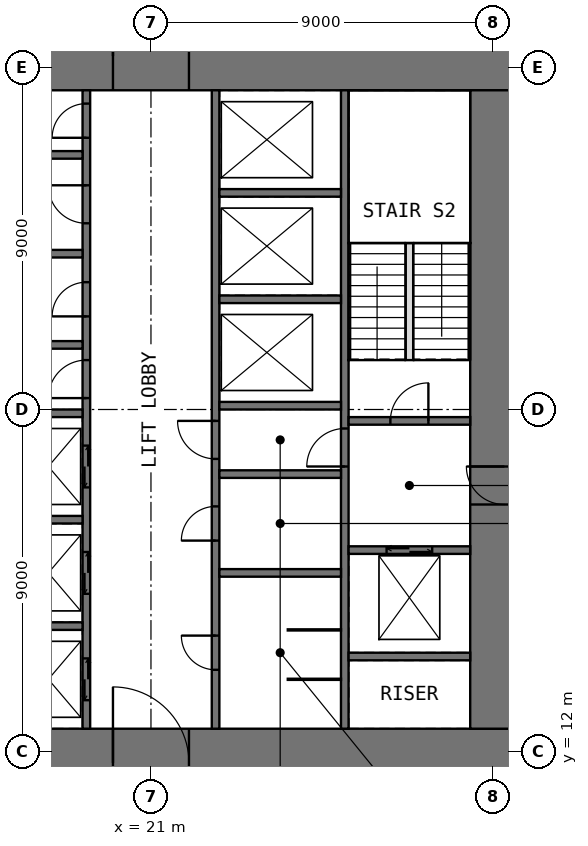
"""IFC4 building model, lengths in metres.
Left out: names, types, materials, properties, quantities, classifications, styles, units other than length and angle.
Written with IfcOpenShell. Run it as: python <this file> out.ifc"""

import sys

from ifc_helpers import new_model, si_unit, direction, frame, frame_2d, origin, place, context, subcontext, project, spatial, rectangle, extrude, element, fill, save


model = new_model("IFC4")
c1 = context("Model", 3, precision=1e-05, world=origin(), true_north=direction((0.0, 1.0)))
c2 = subcontext(c1, "Body", "Model", "MODEL_VIEW")
j1 = project(units=[si_unit("LENGTHUNIT", "METRE"), si_unit("PLANEANGLEUNIT", "RADIAN")], contexts=[c1])
p1 = place(None, origin())
s1 = spatial("IfcSite", under=j1, at=p1, CompositionType="ELEMENT")
p2 = place(p1, origin())
s2 = spatial("IfcBuilding", under=s1, at=p2, CompositionType="ELEMENT")
p3 = place(p2, frame((0.0, 0.0, 54.5)))
s3 = spatial("IfcBuildingStorey", under=s2, at=p3, CompositionType="ELEMENT", Elevation=54.5)
p4 = place(p3, frame((10.8, 11.7, -0.05), z_axis=(0.0, 0.0, 1.0), x_axis=(1.0, 0.0, 0.0)))
e1 = element("IfcWall", 1, at=p4, inside=s3, PredefinedType="SHEAR", context=c2, shape_type="SweptSolid", body=[
    extrude(rectangle(XDim=20.4, YDim=1.8, at=frame_2d((10.2, 0.0))), origin(), (0.0, 0.0, 1.0), 4.0),
])
p5 = place(p4, frame((9.2, 0.0, 0.05)))
e2 = element("IfcOpeningElement", 2, at=p5, cuts=e1, PredefinedType="OPENING", context=c2, shape_type="SweptSolid", body=[
    extrude(rectangle(XDim=2.0, YDim=2.2, at=frame_2d((1.0, 1.1))), frame((0.0, 0.91, 0.0), z_axis=(0.0, -1.0, 0.0), x_axis=(1.0, 0.0, 0.0)), (0.0, 0.0, 1.0), 1.82),
])
p6 = place(p3, frame((10.8, 30.3, -0.05), z_axis=(0.0, 0.0, 1.0), x_axis=(1.0, 0.0, 0.0)))
e3 = element("IfcWall", 3, at=p6, inside=s3, PredefinedType="SHEAR", context=c2, shape_type="SweptSolid", body=[
    extrude(rectangle(XDim=20.4, YDim=1.8, at=frame_2d((10.2, 0.0))), origin(), (0.0, 0.0, 1.0), 4.0),
])
p7 = place(p6, frame((9.2, 0.0, 0.05)))
e4 = element("IfcOpeningElement", 4, at=p7, cuts=e3, PredefinedType="OPENING", context=c2, shape_type="SweptSolid", body=[
    extrude(rectangle(XDim=2.0, YDim=2.2, at=frame_2d((1.0, 1.1))), frame((0.0, 0.91, 0.0), z_axis=(0.0, -1.0, 0.0), x_axis=(1.0, 0.0, 0.0)), (0.0, 0.0, 1.0), 1.82),
])
p8 = place(p3, frame((30.3, 12.6, -0.05), z_axis=(0.0, 0.0, 1.0), x_axis=(0.0, 1.0, 0.0)))
e5 = element("IfcWall", 5, at=p8, inside=s3, PredefinedType="SHEAR", context=c2, shape_type="SweptSolid", body=[
    extrude(rectangle(XDim=16.8, YDim=1.8, at=frame_2d((8.4, 0.0))), origin(), (0.0, 0.0, 1.0), 4.0),
])
p9 = place(p8, frame((5.9, 0.0, 0.05)))
e6 = element("IfcOpeningElement", 6, at=p9, cuts=e5, PredefinedType="OPENING", context=c2, shape_type="SweptSolid", body=[
    extrude(rectangle(XDim=1.0, YDim=2.2, at=frame_2d((0.5, 1.1))), frame((0.0, 0.91, 0.0), z_axis=(0.0, -1.0, 0.0), x_axis=(1.0, 0.0, 0.0)), (0.0, 0.0, 1.0), 1.82),
])
p10 = place(p3, frame((19.3, 12.6, -0.05), z_axis=(0.0, 0.0, 1.0), x_axis=(0.0, 1.0, 0.0)))
e7 = element("IfcWall", 7, at=p10, inside=s3, PredefinedType="SHEAR", context=c2, shape_type="SweptSolid", body=[
    extrude(rectangle(XDim=16.8, YDim=0.2, at=frame_2d((8.4, 0.0))), origin(), (0.0, 0.0, 1.0), 4.0),
])
p11 = place(p10, frame((8.7, 0.0, 0.05)))
e8 = element("IfcOpeningElement", 8, at=p11, cuts=e7, PredefinedType="OPENING", context=c2, shape_type="SweptSolid", body=[
    extrude(rectangle(XDim=1.0, YDim=2.2, at=frame_2d((0.5, 1.1))), frame((0.0, 0.11, 0.0), z_axis=(0.0, -1.0, 0.0), x_axis=(1.0, 0.0, 0.0)), (0.0, 0.0, 1.0), 0.22),
])
p12 = place(p10, frame((10.85, 0.0, 0.05)))
e9 = element("IfcOpeningElement", 9, at=p12, cuts=e7, PredefinedType="OPENING", context=c2, shape_type="SweptSolid", body=[
    extrude(rectangle(XDim=0.9, YDim=2.2, at=frame_2d((0.45, 1.1))), frame((0.0, 0.11, 0.0), z_axis=(0.0, -1.0, 0.0), x_axis=(1.0, 0.0, 0.0)), (0.0, 0.0, 1.0), 0.22),
])
p13 = place(p10, frame((13.3, 0.0, 0.05)))
e10 = element("IfcOpeningElement", 10, at=p13, cuts=e7, PredefinedType="OPENING", context=c2, shape_type="SweptSolid", body=[
    extrude(rectangle(XDim=1.0, YDim=2.2, at=frame_2d((0.5, 1.1))), frame((0.0, 0.11, 0.0), z_axis=(0.0, -1.0, 0.0), x_axis=(1.0, 0.0, 0.0)), (0.0, 0.0, 1.0), 0.22),
])
p14 = place(p10, frame((15.55, 0.0, 0.05)))
e11 = element("IfcOpeningElement", 11, at=p14, cuts=e7, PredefinedType="OPENING", context=c2, shape_type="SweptSolid", body=[
    extrude(rectangle(XDim=0.9, YDim=2.2, at=frame_2d((0.45, 1.1))), frame((0.0, 0.11, 0.0), z_axis=(0.0, -1.0, 0.0), x_axis=(1.0, 0.0, 0.0)), (0.0, 0.0, 1.0), 0.22),
])
p15 = place(p10, frame((0.75, 0.0, 0.05)))
e12 = element("IfcOpeningElement", 12, at=p15, cuts=e7, PredefinedType="OPENING", context=c2, shape_type="SweptSolid", body=[
    extrude(rectangle(XDim=1.1, YDim=2.2, at=frame_2d((0.55, 1.1))), frame((0.0, 0.11, 0.0), z_axis=(0.0, -1.0, 0.0), x_axis=(1.0, 0.0, 0.0)), (0.0, 0.0, 1.0), 0.22),
])
p16 = place(p10, frame((3.55, 0.0, 0.05)))
e13 = element("IfcOpeningElement", 13, at=p16, cuts=e7, PredefinedType="OPENING", context=c2, shape_type="SweptSolid", body=[
    extrude(rectangle(XDim=1.1, YDim=2.2, at=frame_2d((0.55, 1.1))), frame((0.0, 0.11, 0.0), z_axis=(0.0, -1.0, 0.0), x_axis=(1.0, 0.0, 0.0)), (0.0, 0.0, 1.0), 0.22),
])
p17 = place(p10, frame((6.35, 0.0, 0.05)))
e14 = element("IfcOpeningElement", 14, at=p17, cuts=e7, PredefinedType="OPENING", context=c2, shape_type="SweptSolid", body=[
    extrude(rectangle(XDim=1.1, YDim=2.2, at=frame_2d((0.55, 1.1))), frame((0.0, 0.11, 0.0), z_axis=(0.0, -1.0, 0.0), x_axis=(1.0, 0.0, 0.0)), (0.0, 0.0, 1.0), 0.22),
])
p18 = place(p3, frame((22.7, 12.6, -0.05), z_axis=(0.0, 0.0, 1.0), x_axis=(0.0, 1.0, 0.0)))
e15 = element("IfcWall", 15, at=p18, inside=s3, PredefinedType="SHEAR", context=c2, shape_type="SweptSolid", body=[
    extrude(rectangle(XDim=16.8, YDim=0.2, at=frame_2d((8.4, 0.0))), origin(), (0.0, 0.0, 1.0), 4.0),
])
p19 = place(p18, frame((7.1, 0.0, 0.05)))
e16 = element("IfcOpeningElement", 16, at=p19, cuts=e15, PredefinedType="OPENING", context=c2, shape_type="SweptSolid", body=[
    extrude(rectangle(XDim=1.0, YDim=2.2, at=frame_2d((0.5, 1.1))), frame((0.0, 0.11, 0.0), z_axis=(0.0, -1.0, 0.0), x_axis=(1.0, 0.0, 0.0)), (0.0, 0.0, 1.0), 0.22),
])
p20 = place(p18, frame((1.55, 0.0, 0.05)))
e17 = element("IfcOpeningElement", 17, at=p20, cuts=e15, PredefinedType="OPENING", context=c2, shape_type="SweptSolid", body=[
    extrude(rectangle(XDim=0.9, YDim=2.2, at=frame_2d((0.45, 1.1))), frame((0.0, 0.11, 0.0), z_axis=(0.0, -1.0, 0.0), x_axis=(1.0, 0.0, 0.0)), (0.0, 0.0, 1.0), 0.22),
])
p21 = place(p18, frame((4.95, 0.0, 0.05)))
e18 = element("IfcOpeningElement", 18, at=p21, cuts=e15, PredefinedType="OPENING", context=c2, shape_type="SweptSolid", body=[
    extrude(rectangle(XDim=0.9, YDim=2.2, at=frame_2d((0.45, 1.1))), frame((0.0, 0.11, 0.0), z_axis=(0.0, -1.0, 0.0), x_axis=(1.0, 0.0, 0.0)), (0.0, 0.0, 1.0), 0.22),
])
p22 = place(p3, frame((26.1, 12.6, -0.05), z_axis=(0.0, 0.0, 1.0), x_axis=(0.0, 1.0, 0.0)))
e19 = element("IfcWall", 19, at=p22, inside=s3, PredefinedType="SHEAR", context=c2, shape_type="SweptSolid", body=[
    extrude(rectangle(XDim=16.8, YDim=0.2, at=frame_2d((8.4, 0.0))), origin(), (0.0, 0.0, 1.0), 4.0),
])
p23 = place(p22, frame((6.9, 0.0, 0.05)))
e20 = element("IfcOpeningElement", 20, at=p23, cuts=e19, PredefinedType="OPENING", context=c2, shape_type="SweptSolid", body=[
    extrude(rectangle(XDim=1.0, YDim=2.2, at=frame_2d((0.5, 1.1))), frame((0.0, 0.11, 0.0), z_axis=(0.0, -1.0, 0.0), x_axis=(1.0, 0.0, 0.0)), (0.0, 0.0, 1.0), 0.22),
])
for number, where, z_axis, x_axis in (
    (21, (16.0, 15.3, -0.05), (0.0, 0.0, 1.0), (1.0, 0.0, 0.0)),
    (22, (16.0, 18.1, -0.05), (0.0, 0.0, 1.0), (1.0, 0.0, 0.0)),
    (23, (16.0, 20.9, -0.05), (0.0, 0.0, 1.0), (1.0, 0.0, 0.0)),
    (24, (16.0, 22.7, -0.05), (0.0, 0.0, 1.0), (1.0, 0.0, 0.0)),
    (25, (16.0, 25.1, -0.05), (0.0, 0.0, 1.0), (1.0, 0.0, 0.0)),
    (26, (16.0, 27.7, -0.05), (0.0, 0.0, 1.0), (1.0, 0.0, 0.0)),
    (27, (22.8, 16.7, -0.05), (0.0, 0.0, 1.0), (1.0, 0.0, 0.0)),
    (28, (22.8, 19.3, -0.05), (0.0, 0.0, 1.0), (1.0, 0.0, 0.0)),
    (29, (22.8, 21.1, -0.05), (0.0, 0.0, 1.0), (1.0, 0.0, 0.0)),
    (30, (22.8, 23.9, -0.05), (0.0, 0.0, 1.0), (1.0, 0.0, 0.0)),
    (31, (22.8, 26.7, -0.05), (0.0, 0.0, 1.0), (1.0, 0.0, 0.0)),
    (32, (26.2, 14.5, -0.05), (0.0, 0.0, 1.0), (1.0, 0.0, 0.0)),
):
    element("IfcWall", number, at=place(p3, frame(where, z_axis=z_axis, x_axis=x_axis)), inside=s3, PredefinedType="SHEAR", context=c2, shape_type="SweptSolid", body=[
        extrude(rectangle(XDim=3.2, YDim=0.2, at=frame_2d((1.6, 0.0))), origin(), (0.0, 0.0, 1.0), 4.0),
    ])
p24 = place(p3, frame((26.2, 17.3, -0.05), z_axis=(0.0, 0.0, 1.0), x_axis=(1.0, 0.0, 0.0)))
e33 = element("IfcWall", 33, at=p24, inside=s3, PredefinedType="SHEAR", context=c2, shape_type="SweptSolid", body=[
    extrude(rectangle(XDim=3.2, YDim=0.2, at=frame_2d((1.6, 0.0))), origin(), (0.0, 0.0, 1.0), 4.0),
])
p25 = place(p24, frame((1.0, 0.0, 0.05)))
e34 = element("IfcOpeningElement", 34, at=p25, cuts=e33, PredefinedType="OPENING", context=c2, shape_type="SweptSolid", body=[
    extrude(rectangle(XDim=1.2, YDim=2.2, at=frame_2d((0.6, 1.1))), frame((0.0, 0.11, 0.0), z_axis=(0.0, -1.0, 0.0), x_axis=(1.0, 0.0, 0.0)), (0.0, 0.0, 1.0), 0.22),
])
p26 = place(p3, frame((26.2, 20.7, -0.05), z_axis=(0.0, 0.0, 1.0), x_axis=(1.0, 0.0, 0.0)))
e35 = element("IfcWall", 35, at=p26, inside=s3, PredefinedType="SHEAR", context=c2, shape_type="SweptSolid", body=[
    extrude(rectangle(XDim=3.2, YDim=0.2, at=frame_2d((1.6, 0.0))), origin(), (0.0, 0.0, 1.0), 4.0),
])
p27 = place(p26, frame((1.1, 0.0, 0.05)))
e36 = element("IfcOpeningElement", 36, at=p27, cuts=e35, PredefinedType="OPENING", context=c2, shape_type="SweptSolid", body=[
    extrude(rectangle(XDim=1.0, YDim=2.2, at=frame_2d((0.5, 1.1))), frame((0.0, 0.11, 0.0), z_axis=(0.0, -1.0, 0.0), x_axis=(1.0, 0.0, 0.0)), (0.0, 0.0, 1.0), 0.22),
])
for number, where, z_axis, x_axis in (
    (37, (24.6, 13.9, 0.0), (0.0, 0.0, 1.0), (1.0, 0.0, 0.0)),
    (38, (24.6, 15.2, 0.0), (0.0, 0.0, 1.0), (1.0, 0.0, 0.0)),
):
    element("IfcWall", number, at=place(p3, frame(where, z_axis=z_axis, x_axis=x_axis)), inside=s3, PredefinedType="PARTITIONING", context=c2, shape_type="SweptSolid", body=[
        extrude(rectangle(XDim=1.4, YDim=0.03, at=frame_2d((0.7, 0.0))), origin(), (0.0, 0.0, 1.0), 3.75),
    ])
p28 = place(p3, frame((27.8, 22.3, 0.0), z_axis=(0.0, 0.0, 1.0), x_axis=(0.0, 1.0, 0.0)))
e39 = element("IfcWall", 39, at=p28, inside=s3, PredefinedType="PARTITIONING", context=c2, shape_type="SweptSolid", body=[
    extrude(rectangle(XDim=3.08, YDim=0.2, at=frame_2d((1.54, 0.0))), origin(), (0.0, 0.0, 1.0), 4.0),
])
p29 = place(p5, origin())
e40 = element("IfcDoor", 40, at=p29, inside=s3, OperationType="DOUBLE_DOOR_SINGLE_SWING", PredefinedType="DOOR", context=c2, shape_type="SweptSolid", body=[
    extrude(rectangle(XDim=2.0, YDim=2.2, at=frame_2d((1.0, 1.1))), frame((0.0, 0.025, 0.0), z_axis=(0.0, -1.0, 0.0), x_axis=(1.0, 0.0, 0.0)), (0.0, 0.0, 1.0), 0.05),
])
fill(e2, e40)
p30 = place(p7, origin())
e41 = element("IfcDoor", 41, at=p30, inside=s3, OperationType="DOUBLE_DOOR_SINGLE_SWING", PredefinedType="DOOR", context=c2, shape_type="SweptSolid", body=[
    extrude(rectangle(XDim=2.0, YDim=2.2, at=frame_2d((1.0, 1.1))), frame((0.0, 0.025, 0.0), z_axis=(0.0, -1.0, 0.0), x_axis=(1.0, 0.0, 0.0)), (0.0, 0.0, 1.0), 0.05),
])
fill(e4, e41)
p31 = place(p9, origin())
e42 = element("IfcDoor", 42, at=p31, inside=s3, OperationType="SINGLE_SWING_RIGHT", PredefinedType="DOOR", context=c2, shape_type="SweptSolid", body=[
    extrude(rectangle(XDim=1.0, YDim=2.2, at=frame_2d((0.5, 1.1))), frame((0.0, 0.025, 0.0), z_axis=(0.0, -1.0, 0.0), x_axis=(1.0, 0.0, 0.0)), (0.0, 0.0, 1.0), 0.05),
])
fill(e6, e42)
p32 = place(p27, origin())
e43 = element("IfcDoor", 43, at=p32, inside=s3, OperationType="SINGLE_SWING_RIGHT", PredefinedType="DOOR", context=c2, shape_type="SweptSolid", body=[
    extrude(rectangle(XDim=1.0, YDim=2.2, at=frame_2d((0.5, 1.1))), frame((0.0, 0.025, 0.0), z_axis=(0.0, -1.0, 0.0), x_axis=(1.0, 0.0, 0.0)), (0.0, 0.0, 1.0), 0.05),
])
fill(e36, e43)
p33 = place(p23, origin())
e44 = element("IfcDoor", 44, at=p33, inside=s3, OperationType="SINGLE_SWING_LEFT", PredefinedType="DOOR", context=c2, shape_type="SweptSolid", body=[
    extrude(rectangle(XDim=1.0, YDim=2.2, at=frame_2d((0.5, 1.1))), frame((0.0, 0.025, 0.0), z_axis=(0.0, -1.0, 0.0), x_axis=(1.0, 0.0, 0.0)), (0.0, 0.0, 1.0), 0.05),
])
fill(e20, e44)
p34 = place(p11, origin())
e45 = element("IfcDoor", 45, at=p34, inside=s3, OperationType="SINGLE_SWING_LEFT", PredefinedType="DOOR", context=c2, shape_type="SweptSolid", body=[
    extrude(rectangle(XDim=1.0, YDim=2.2, at=frame_2d((0.5, 1.1))), frame((0.0, 0.025, 0.0), z_axis=(0.0, -1.0, 0.0), x_axis=(1.0, 0.0, 0.0)), (0.0, 0.0, 1.0), 0.05),
])
fill(e8, e45)
p35 = place(p19, origin())
e46 = element("IfcDoor", 46, at=p35, inside=s3, OperationType="SINGLE_SWING_RIGHT", PredefinedType="DOOR", context=c2, shape_type="SweptSolid", body=[
    extrude(rectangle(XDim=1.0, YDim=2.2, at=frame_2d((0.5, 1.1))), frame((0.0, 0.025, 0.0), z_axis=(0.0, -1.0, 0.0), x_axis=(1.0, 0.0, 0.0)), (0.0, 0.0, 1.0), 0.05),
])
fill(e16, e46)
p36 = place(p12, origin())
e47 = element("IfcDoor", 47, at=p36, inside=s3, OperationType="SINGLE_SWING_LEFT", PredefinedType="DOOR", context=c2, shape_type="SweptSolid", body=[
    extrude(rectangle(XDim=0.9, YDim=2.2, at=frame_2d((0.45, 1.1))), frame((0.0, 0.025, 0.0), z_axis=(0.0, -1.0, 0.0), x_axis=(1.0, 0.0, 0.0)), (0.0, 0.0, 1.0), 0.05),
])
fill(e9, e47)
p37 = place(p13, origin())
e48 = element("IfcDoor", 48, at=p37, inside=s3, OperationType="SINGLE_SWING_RIGHT", PredefinedType="DOOR", context=c2, shape_type="SweptSolid", body=[
    extrude(rectangle(XDim=1.0, YDim=2.2, at=frame_2d((0.5, 1.1))), frame((0.0, 0.025, 0.0), z_axis=(0.0, -1.0, 0.0), x_axis=(1.0, 0.0, 0.0)), (0.0, 0.0, 1.0), 0.05),
])
fill(e10, e48)
p38 = place(p14, origin())
e49 = element("IfcDoor", 49, at=p38, inside=s3, OperationType="SINGLE_SWING_LEFT", PredefinedType="DOOR", context=c2, shape_type="SweptSolid", body=[
    extrude(rectangle(XDim=0.9, YDim=2.2, at=frame_2d((0.45, 1.1))), frame((0.0, 0.025, 0.0), z_axis=(0.0, -1.0, 0.0), x_axis=(1.0, 0.0, 0.0)), (0.0, 0.0, 1.0), 0.05),
])
fill(e11, e49)
p39 = place(p20, origin())
e50 = element("IfcDoor", 50, at=p39, inside=s3, OperationType="SINGLE_SWING_RIGHT", PredefinedType="DOOR", context=c2, shape_type="SweptSolid", body=[
    extrude(rectangle(XDim=0.9, YDim=2.2, at=frame_2d((0.45, 1.1))), frame((0.0, 0.025, 0.0), z_axis=(0.0, -1.0, 0.0), x_axis=(1.0, 0.0, 0.0)), (0.0, 0.0, 1.0), 0.05),
])
fill(e17, e50)
p40 = place(p21, origin())
e51 = element("IfcDoor", 51, at=p40, inside=s3, OperationType="SINGLE_SWING_LEFT", PredefinedType="DOOR", context=c2, shape_type="SweptSolid", body=[
    extrude(rectangle(XDim=0.9, YDim=2.2, at=frame_2d((0.45, 1.1))), frame((0.0, 0.025, 0.0), z_axis=(0.0, -1.0, 0.0), x_axis=(1.0, 0.0, 0.0)), (0.0, 0.0, 1.0), 0.05),
])
fill(e18, e51)
p41 = place(p15, origin())
e52 = element("IfcDoor", 52, at=p41, inside=s3, OperationType="DOUBLE_DOOR_SLIDING", PredefinedType="DOOR", context=c2, shape_type="SweptSolid", body=[
    extrude(rectangle(XDim=1.1, YDim=2.2, at=frame_2d((0.55, 1.1))), frame((0.0, 0.025, 0.0), z_axis=(0.0, -1.0, 0.0), x_axis=(1.0, 0.0, 0.0)), (0.0, 0.0, 1.0), 0.05),
])
fill(e12, e52)
p42 = place(p16, origin())
e53 = element("IfcDoor", 53, at=p42, inside=s3, OperationType="DOUBLE_DOOR_SLIDING", PredefinedType="DOOR", context=c2, shape_type="SweptSolid", body=[
    extrude(rectangle(XDim=1.1, YDim=2.2, at=frame_2d((0.55, 1.1))), frame((0.0, 0.025, 0.0), z_axis=(0.0, -1.0, 0.0), x_axis=(1.0, 0.0, 0.0)), (0.0, 0.0, 1.0), 0.05),
])
fill(e13, e53)
p43 = place(p17, origin())
e54 = element("IfcDoor", 54, at=p43, inside=s3, OperationType="DOUBLE_DOOR_SLIDING", PredefinedType="DOOR", context=c2, shape_type="SweptSolid", body=[
    extrude(rectangle(XDim=1.1, YDim=2.2, at=frame_2d((0.55, 1.1))), frame((0.0, 0.025, 0.0), z_axis=(0.0, -1.0, 0.0), x_axis=(1.0, 0.0, 0.0)), (0.0, 0.0, 1.0), 0.05),
])
fill(e14, e54)
p44 = place(p25, origin())
e55 = element("IfcDoor", 55, at=p44, inside=s3, OperationType="DOUBLE_DOOR_SLIDING", PredefinedType="DOOR", context=c2, shape_type="SweptSolid", body=[
    extrude(rectangle(XDim=1.2, YDim=2.2, at=frame_2d((0.6, 1.1))), frame((0.0, 0.025, 0.0), z_axis=(0.0, -1.0, 0.0), x_axis=(1.0, 0.0, 0.0)), (0.0, 0.0, 1.0), 0.05),
])
fill(e34, e55)
save(model, sys.argv[1])
